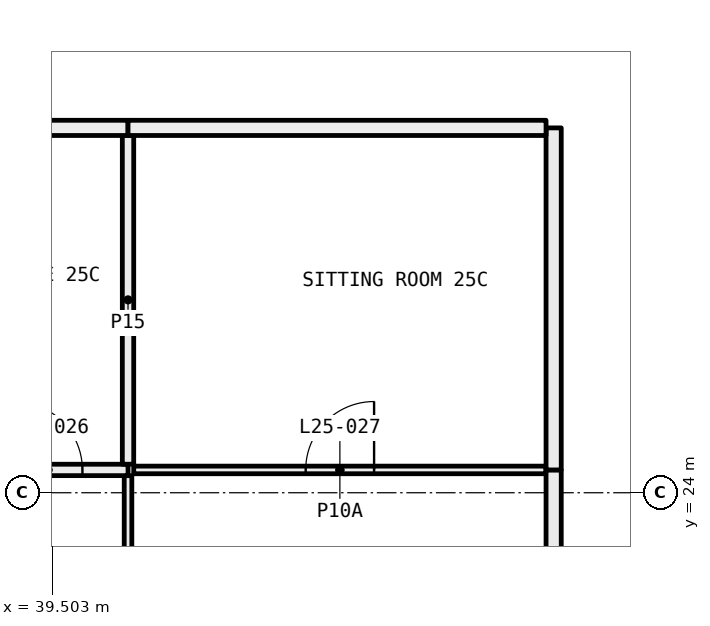
"""IFC4 building model, lengths in metres.
Left out: names, types, materials, properties, quantities, classifications, styles, units other than length and angle.
Written with IfcOpenShell. Run it as: python <this file> out.ifc"""

import sys

from ifc_helpers import new_model, si_unit, direction, frame, frame_2d, origin, place, context, subcontext, project, spatial, rectangle, extrude, element, fill, save


model = new_model("IFC4")
c1 = context("Model", 3, precision=1e-05, world=origin(), true_north=direction((0.0, 1.0)))
c2 = subcontext(c1, "Body", "Model", "MODEL_VIEW")
j1 = project(units=[si_unit("LENGTHUNIT", "METRE"), si_unit("PLANEANGLEUNIT", "RADIAN")], contexts=[c1])
p1 = place(None, origin())
s1 = spatial("IfcSite", under=j1, at=p1, CompositionType="ELEMENT")
p2 = place(p1, origin())
s2 = spatial("IfcBuilding", under=s1, at=p2, CompositionType="ELEMENT")
p3 = place(p2, frame((0.0, 0.0, 100.05)))
s3 = spatial("IfcBuildingStorey", under=s2, at=p3, CompositionType="ELEMENT", Elevation=100.05)
p4 = place(p3, frame((40.5, 18.075, 0.0), z_axis=(0.0, 0.0, 1.0), x_axis=(0.0, 1.0, 0.0)))
e1 = element("IfcWall", 1, at=p4, inside=s3, PredefinedType="PARTITIONING", context=c2, shape_type="SweptSolid", body=[
    extrude(rectangle(XDim=6.15, YDim=0.1, at=frame_2d((3.075, 0.0))), origin(), (0.0, 0.0, 1.0), 2.45),
])
p5 = place(p4, frame((2.625, 0.0, 0.0)))
e2 = element("IfcOpeningElement", 2, at=p5, cuts=e1, PredefinedType="OPENING", context=c2, shape_type="SweptSolid", body=[
    extrude(rectangle(XDim=0.9, YDim=2.1, at=frame_2d((0.45, 1.05))), frame((0.0, 0.06, 0.0), z_axis=(0.0, -1.0, 0.0), x_axis=(1.0, 0.0, 0.0)), (0.0, 0.0, 1.0), 0.12),
])
p6 = place(p3, frame((40.5, 24.3, 0.0), z_axis=(0.0, 0.0, 1.0), x_axis=(-1.0, 0.0, 0.0)))
e3 = element("IfcWall", 3, at=p6, inside=s3, PredefinedType="PARTITIONING", context=c2, shape_type="SweptSolid", body=[
    extrude(rectangle(XDim=2.1, YDim=0.15, at=frame_2d((1.05, 0.0))), origin(), (0.0, 0.0, 1.0), 3.05),
])
p7 = place(p6, frame((0.6, 0.0, 0.0)))
e4 = element("IfcOpeningElement", 4, at=p7, cuts=e3, PredefinedType="OPENING", context=c2, shape_type="SweptSolid", body=[
    extrude(rectangle(XDim=0.9, YDim=2.1, at=frame_2d((0.45, 1.05))), frame((0.0, 0.085, 0.0), z_axis=(0.0, -1.0, 0.0), x_axis=(1.0, 0.0, 0.0)), (0.0, 0.0, 1.0), 0.17),
])
p8 = place(p3, frame((46.0, 24.3, 0.0), z_axis=(0.0, 0.0, 1.0), x_axis=(-1.0, 0.0, 0.0)))
e5 = element("IfcWall", 5, at=p8, inside=s3, PredefinedType="PARTITIONING", context=c2, shape_type="SweptSolid", body=[
    extrude(rectangle(XDim=5.425, YDim=0.1, at=frame_2d((2.712, 0.0))), origin(), (0.0, 0.0, 1.0), 3.05),
])
p9 = place(p8, frame((2.262, 0.0, 0.0)))
e6 = element("IfcOpeningElement", 6, at=p9, cuts=e5, PredefinedType="OPENING", context=c2, shape_type="SweptSolid", body=[
    extrude(rectangle(XDim=0.9, YDim=2.1, at=frame_2d((0.45, 1.05))), frame((0.0, 0.06, 0.0), z_axis=(0.0, -1.0, 0.0), x_axis=(1.0, 0.0, 0.0)), (0.0, 0.0, 1.0), 0.12),
])
p10 = place(p3, frame((46.1, 18.1, 0.0), z_axis=(0.0, 0.0, 1.0), x_axis=(0.0, 1.0, 0.0)))
e7 = element("IfcWall", 7, at=p10, inside=s3, PredefinedType="PARTITIONING", context=c2, shape_type="SweptSolid", body=[
    extrude(rectangle(XDim=6.2, YDim=0.2, at=frame_2d((3.1, 0.0))), origin(), (0.0, 0.0, 1.0), 2.45),
])
p11 = place(p3, frame((40.5, 24.375, 0.0), z_axis=(0.0, 0.0, 1.0), x_axis=(0.0, 1.0, 0.0)))
e8 = element("IfcWall", 8, at=p11, inside=s3, PredefinedType="PARTITIONING", context=c2, shape_type="SweptSolid", body=[
    extrude(rectangle(XDim=4.325, YDim=0.15, at=frame_2d((2.163, 0.0))), origin(), (0.0, 0.0, 1.0), 3.05),
])
p12 = place(p3, frame((40.5, 28.8, 0.0), z_axis=(0.0, 0.0, 1.0), x_axis=(-1.0, 0.0, 0.0)))
e9 = element("IfcWall", 9, at=p12, inside=s3, PredefinedType="PARTITIONING", context=c2, shape_type="SweptSolid", body=[
    extrude(rectangle(XDim=2.1, YDim=0.2, at=frame_2d((1.05, 0.0))), origin(), (0.0, 0.0, 1.0), 3.05),
])
p13 = place(p3, frame((46.1, 24.3, 0.0), z_axis=(0.0, 0.0, 1.0), x_axis=(0.0, 1.0, 0.0)))
e10 = element("IfcWall", 10, at=p13, inside=s3, PredefinedType="PARTITIONING", context=c2, shape_type="SweptSolid", body=[
    extrude(rectangle(XDim=4.5, YDim=0.2, at=frame_2d((2.25, 0.0))), origin(), (0.0, 0.0, 1.0), 3.05),
])
p14 = place(p3, frame((46.0, 28.8, 0.0), z_axis=(0.0, 0.0, 1.0), x_axis=(-1.0, 0.0, 0.0)))
e11 = element("IfcWall", 11, at=p14, inside=s3, PredefinedType="PARTITIONING", context=c2, shape_type="SweptSolid", body=[
    extrude(rectangle(XDim=5.5, YDim=0.2, at=frame_2d((2.75, 0.0))), origin(), (0.0, 0.0, 1.0), 3.05),
])
p15 = place(p7, frame((0.9, 0.0, 0.0), x_axis=(-1.0, 0.0, 0.0)))
e12 = element("IfcDoor", 12, at=p15, inside=s3, OperationType="SINGLE_SWING_RIGHT", PredefinedType="DOOR", context=c2, shape_type="SweptSolid", body=[
    extrude(rectangle(XDim=0.9, YDim=2.1, at=frame_2d((0.45, 1.05))), frame((0.0, 0.025, 0.0), z_axis=(0.0, -1.0, 0.0), x_axis=(1.0, 0.0, 0.0)), (0.0, 0.0, 1.0), 0.05),
])
fill(e4, e12)
p16 = place(p9, frame((0.9, 0.0, 0.0), x_axis=(-1.0, 0.0, 0.0)))
e13 = element("IfcDoor", 13, at=p16, inside=s3, OperationType="SINGLE_SWING_LEFT", PredefinedType="DOOR", context=c2, shape_type="SweptSolid", body=[
    extrude(rectangle(XDim=0.9, YDim=2.1, at=frame_2d((0.45, 1.05))), frame((0.0, 0.025, 0.0), z_axis=(0.0, -1.0, 0.0), x_axis=(1.0, 0.0, 0.0)), (0.0, 0.0, 1.0), 0.05),
])
fill(e6, e13)
save(model, sys.argv[1])
